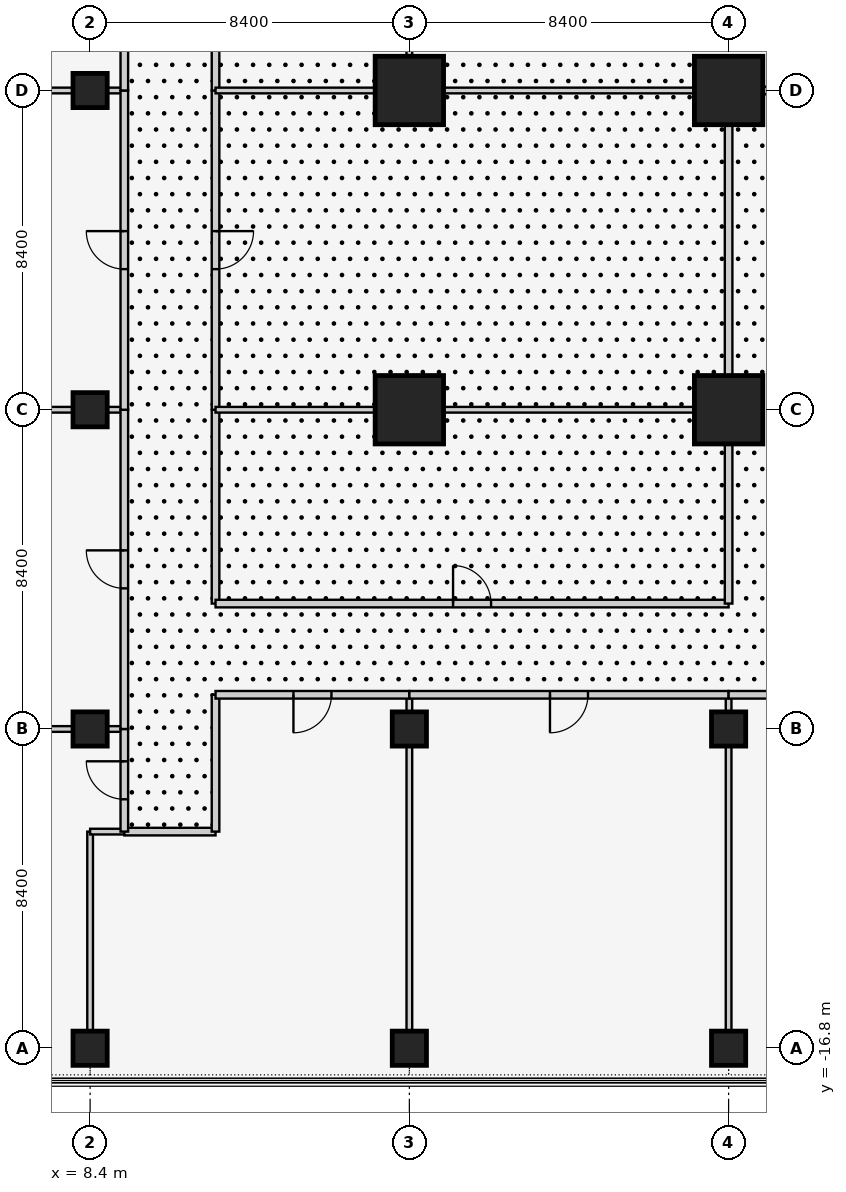
"""IFC4 building model, lengths in metres.
Left out: names, types, materials, properties, quantities, classifications, styles, units other than length and angle.
Written with IfcOpenShell. Run it as: python <this file> out.ifc"""

import sys

from ifc_helpers import new_model, si_unit, direction, frame, frame_2d, origin, origin_2d, place, context, subcontext, project, spatial, rectangle, extrude, element, fill, save


model = new_model("IFC4")
c1 = context("Model", 3, precision=1e-05, world=origin(), true_north=direction((0.0, 1.0)))
c2 = subcontext(c1, "Body", "Model", "MODEL_VIEW")
j1 = project(units=[si_unit("LENGTHUNIT", "METRE"), si_unit("PLANEANGLEUNIT", "RADIAN")], contexts=[c1])
p1 = place(None, origin())
s1 = spatial("IfcSite", under=j1, at=p1, CompositionType="ELEMENT")
p2 = place(p1, origin())
s2 = spatial("IfcBuilding", under=s1, at=p2, CompositionType="ELEMENT")
p3 = place(p2, frame((0.0, 0.0, 6.0)))
s3 = spatial("IfcBuildingStorey", under=s2, at=p3, CompositionType="ELEMENT", Elevation=6.0)
for number, where, z_axis, x_axis in (
    (1, (8.4, -16.8, 0.0), (0.0, 0.0, 1.0), (1.0, 0.0, 0.0)),
    (2, (8.4, -8.4, 0.0), (0.0, 0.0, 1.0), (1.0, 0.0, 0.0)),
    (3, (8.4, 0.0, 0.0), (0.0, 0.0, 1.0), (1.0, 0.0, 0.0)),
    (4, (8.4, 8.4, 0.0), (0.0, 0.0, 1.0), (1.0, 0.0, 0.0)),
    (5, (16.8, -16.8, 0.0), (0.0, 0.0, 1.0), (1.0, 0.0, 0.0)),
    (6, (16.8, -8.4, 0.0), (0.0, 0.0, 1.0), (1.0, 0.0, 0.0)),
):
    element("IfcColumn", number, at=place(p3, frame(where, z_axis=z_axis, x_axis=x_axis)), inside=s3, PredefinedType="COLUMN", context=c2, shape_type="SweptSolid", body=[
        extrude(rectangle(XDim=0.9, YDim=0.9, at=origin_2d()), origin(), (0.0, 0.0, 1.0), 4.5),
    ])
for number, where, z_axis, x_axis in (
    (7, (16.8, 0.0, 0.0), (0.0, 0.0, 1.0), (1.0, 0.0, 0.0)),
    (8, (16.8, 8.4, 0.0), (0.0, 0.0, 1.0), (1.0, 0.0, 0.0)),
):
    element("IfcColumn", number, at=place(p3, frame(where, z_axis=z_axis, x_axis=x_axis)), inside=s3, PredefinedType="COLUMN", context=c2, shape_type="SweptSolid", body=[
        extrude(rectangle(XDim=1.8, YDim=1.8, at=origin_2d()), origin(), (0.0, 0.0, 1.0), 4.5),
    ])
for number, where, z_axis, x_axis in (
    (9, (25.2, -16.8, 0.0), (0.0, 0.0, 1.0), (1.0, 0.0, 0.0)),
    (10, (25.2, -8.4, 0.0), (0.0, 0.0, 1.0), (1.0, 0.0, 0.0)),
):
    element("IfcColumn", number, at=place(p3, frame(where, z_axis=z_axis, x_axis=x_axis)), inside=s3, PredefinedType="COLUMN", context=c2, shape_type="SweptSolid", body=[
        extrude(rectangle(XDim=0.9, YDim=0.9, at=origin_2d()), origin(), (0.0, 0.0, 1.0), 4.5),
    ])
for number, where, z_axis, x_axis in (
    (11, (25.2, 0.0, 0.0), (0.0, 0.0, 1.0), (1.0, 0.0, 0.0)),
    (12, (25.2, 8.4, 0.0), (0.0, 0.0, 1.0), (1.0, 0.0, 0.0)),
):
    element("IfcColumn", number, at=place(p3, frame(where, z_axis=z_axis, x_axis=x_axis)), inside=s3, PredefinedType="COLUMN", context=c2, shape_type="SweptSolid", body=[
        extrude(rectangle(XDim=1.8, YDim=1.8, at=origin_2d()), origin(), (0.0, 0.0, 1.0), 4.5),
    ])
p4 = place(p3, frame((8.4, -16.35, 0.0), z_axis=(0.0, 0.0, 1.0), x_axis=(0.0, 1.0, 0.0)))
e13 = element("IfcWall", 13, at=p4, inside=s3, PredefinedType="PARTITIONING", context=c2, shape_type="SweptSolid", body=[
    extrude(rectangle(XDim=5.25, YDim=0.15, at=frame_2d((2.625, 0.0))), origin(), (0.0, 0.0, 1.0), 3.543),
])
p5 = place(p3, frame((8.4, -11.1, 0.0), z_axis=(0.0, 0.0, 1.0), x_axis=(1.0, 0.0, 0.0)))
e14 = element("IfcWall", 14, at=p5, inside=s3, PredefinedType="PARTITIONING", context=c2, shape_type="SweptSolid", body=[
    extrude(rectangle(XDim=0.9, YDim=0.15, at=frame_2d((0.45, 0.0))), origin(), (0.0, 0.0, 1.0), 4.3),
])
p6 = place(p3, frame((16.8, -8.85, 0.0), z_axis=(0.0, 0.0, 1.0), x_axis=(0.0, -1.0, 0.0)))
e15 = element("IfcWall", 15, at=p6, inside=s3, PredefinedType="PARTITIONING", context=c2, shape_type="SweptSolid", body=[
    extrude(rectangle(XDim=7.5, YDim=0.15, at=frame_2d((3.75, 0.0))), origin(), (0.0, 0.0, 1.0), 3.543),
])
p7 = place(p3, frame((16.8, -7.5, 0.0), z_axis=(0.0, 0.0, 1.0), x_axis=(0.0, -1.0, 0.0)))
e16 = element("IfcWall", 16, at=p7, inside=s3, PredefinedType="PARTITIONING", context=c2, shape_type="SweptSolid", body=[
    extrude(rectangle(XDim=0.45, YDim=0.15, at=frame_2d((0.225, 0.0))), origin(), (0.0, 0.0, 1.0), 3.543),
])
p8 = place(p3, frame((9.3, -11.1, 0.0), z_axis=(0.0, 0.0, 1.0), x_axis=(1.0, 0.0, 0.0)))
e17 = element("IfcWall", 17, at=p8, inside=s3, PredefinedType="PARTITIONING", context=c2, shape_type="SweptSolid", body=[
    extrude(rectangle(XDim=2.4, YDim=0.2, at=frame_2d((1.2, 0.0))), origin(), (0.0, 0.0, 1.0), 4.3),
])
p9 = place(p3, frame((11.7, -11.1, 0.0), z_axis=(0.0, 0.0, 1.0), x_axis=(0.0, 1.0, 0.0)))
e18 = element("IfcWall", 18, at=p9, inside=s3, PredefinedType="PARTITIONING", context=c2, shape_type="SweptSolid", body=[
    extrude(rectangle(XDim=3.6, YDim=0.2, at=frame_2d((1.8, 0.0))), origin(), (0.0, 0.0, 1.0), 4.3),
])
p10 = place(p3, frame((11.7, -7.5, 0.0), z_axis=(0.0, 0.0, 1.0), x_axis=(1.0, 0.0, 0.0)))
e19 = element("IfcWall", 19, at=p10, inside=s3, PredefinedType="PARTITIONING", context=c2, shape_type="SweptSolid", body=[
    extrude(rectangle(XDim=5.1, YDim=0.2, at=frame_2d((2.55, 0.0))), origin(), (0.0, 0.0, 1.0), 4.3),
])
p11 = place(p10, frame((2.05, 0.0, 0.0)))
e20 = element("IfcOpeningElement", 20, at=p11, cuts=e19, PredefinedType="OPENING", context=c2, shape_type="SweptSolid", body=[
    extrude(rectangle(XDim=1.0, YDim=2.1, at=frame_2d((0.5, 1.05))), frame((0.0, 0.11, 0.0), z_axis=(0.0, -1.0, 0.0), x_axis=(1.0, 0.0, 0.0)), (0.0, 0.0, 1.0), 0.22),
])
p12 = place(p3, frame((0.45, -8.4, 0.0), z_axis=(0.0, 0.0, 1.0), x_axis=(1.0, 0.0, 0.0)))
e21 = element("IfcWall", 21, at=p12, inside=s3, PredefinedType="PARTITIONING", context=c2, shape_type="SweptSolid", body=[
    extrude(rectangle(XDim=7.5, YDim=0.15, at=frame_2d((3.75, 0.0))), origin(), (0.0, 0.0, 1.0), 3.543),
])
p13 = place(p3, frame((8.85, -8.4, 0.0), z_axis=(0.0, 0.0, 1.0), x_axis=(1.0, 0.0, 0.0)))
e22 = element("IfcWall", 22, at=p13, inside=s3, PredefinedType="PARTITIONING", context=c2, shape_type="SweptSolid", body=[
    extrude(rectangle(XDim=0.45, YDim=0.15, at=frame_2d((0.225, 0.0))), origin(), (0.0, 0.0, 1.0), 3.543),
])
p14 = place(p3, frame((9.3, -8.4, 0.0), z_axis=(0.0, 0.0, 1.0), x_axis=(0.0, -1.0, 0.0)))
e23 = element("IfcWall", 23, at=p14, inside=s3, PredefinedType="PARTITIONING", context=c2, shape_type="SweptSolid", body=[
    extrude(rectangle(XDim=2.7, YDim=0.2, at=frame_2d((1.35, 0.0))), origin(), (0.0, 0.0, 1.0), 4.3),
])
p15 = place(p14, frame((0.85, 0.0, 0.0)))
e24 = element("IfcOpeningElement", 24, at=p15, cuts=e23, PredefinedType="OPENING", context=c2, shape_type="SweptSolid", body=[
    extrude(rectangle(XDim=1.0, YDim=2.1, at=frame_2d((0.5, 1.05))), frame((0.0, 0.11, 0.0), z_axis=(0.0, -1.0, 0.0), x_axis=(1.0, 0.0, 0.0)), (0.0, 0.0, 1.0), 0.22),
])
p16 = place(p3, frame((25.2, -8.85, 0.0), z_axis=(0.0, 0.0, 1.0), x_axis=(0.0, -1.0, 0.0)))
e25 = element("IfcWall", 25, at=p16, inside=s3, PredefinedType="PARTITIONING", context=c2, shape_type="SweptSolid", body=[
    extrude(rectangle(XDim=7.5, YDim=0.15, at=frame_2d((3.75, 0.0))), origin(), (0.0, 0.0, 1.0), 3.543),
])
p17 = place(p3, frame((25.2, -7.5, 0.0), z_axis=(0.0, 0.0, 1.0), x_axis=(0.0, -1.0, 0.0)))
e26 = element("IfcWall", 26, at=p17, inside=s3, PredefinedType="PARTITIONING", context=c2, shape_type="SweptSolid", body=[
    extrude(rectangle(XDim=0.45, YDim=0.15, at=frame_2d((0.225, 0.0))), origin(), (0.0, 0.0, 1.0), 3.543),
])
p18 = place(p3, frame((16.8, -7.5, 0.0), z_axis=(0.0, 0.0, 1.0), x_axis=(1.0, 0.0, 0.0)))
e27 = element("IfcWall", 27, at=p18, inside=s3, PredefinedType="PARTITIONING", context=c2, shape_type="SweptSolid", body=[
    extrude(rectangle(XDim=8.4, YDim=0.2, at=frame_2d((4.2, 0.0))), origin(), (0.0, 0.0, 1.0), 4.3),
])
p19 = place(p18, frame((3.7, 0.0, 0.0)))
e28 = element("IfcOpeningElement", 28, at=p19, cuts=e27, PredefinedType="OPENING", context=c2, shape_type="SweptSolid", body=[
    extrude(rectangle(XDim=1.0, YDim=2.1, at=frame_2d((0.5, 1.05))), frame((0.0, 0.11, 0.0), z_axis=(0.0, -1.0, 0.0), x_axis=(1.0, 0.0, 0.0)), (0.0, 0.0, 1.0), 0.22),
])
p20 = place(p3, frame((25.2, -7.5, 0.0), z_axis=(0.0, 0.0, 1.0), x_axis=(1.0, 0.0, 0.0)))
e29 = element("IfcWall", 29, at=p20, inside=s3, PredefinedType="PARTITIONING", context=c2, shape_type="SweptSolid", body=[
    extrude(rectangle(XDim=8.4, YDim=0.2, at=frame_2d((4.2, 0.0))), origin(), (0.0, 0.0, 1.0), 4.3),
])
p21 = place(p20, frame((3.7, 0.0, 0.0)))
e30 = element("IfcOpeningElement", 30, at=p21, cuts=e29, PredefinedType="OPENING", context=c2, shape_type="SweptSolid", body=[
    extrude(rectangle(XDim=1.0, YDim=2.1, at=frame_2d((0.5, 1.05))), frame((0.0, 0.11, 0.0), z_axis=(0.0, -1.0, 0.0), x_axis=(1.0, 0.0, 0.0)), (0.0, 0.0, 1.0), 0.22),
])
p22 = place(p3, frame((0.45, 0.0, 0.0), z_axis=(0.0, 0.0, 1.0), x_axis=(1.0, 0.0, 0.0)))
e31 = element("IfcWall", 31, at=p22, inside=s3, PredefinedType="PARTITIONING", context=c2, shape_type="SweptSolid", body=[
    extrude(rectangle(XDim=7.5, YDim=0.15, at=frame_2d((3.75, 0.0))), origin(), (0.0, 0.0, 1.0), 3.543),
])
p23 = place(p3, frame((8.85, 0.0, 0.0), z_axis=(0.0, 0.0, 1.0), x_axis=(1.0, 0.0, 0.0)))
e32 = element("IfcWall", 32, at=p23, inside=s3, PredefinedType="PARTITIONING", context=c2, shape_type="SweptSolid", body=[
    extrude(rectangle(XDim=0.45, YDim=0.15, at=frame_2d((0.225, 0.0))), origin(), (0.0, 0.0, 1.0), 3.543),
])
p24 = place(p3, frame((9.3, 0.0, 0.0), z_axis=(0.0, 0.0, 1.0), x_axis=(0.0, -1.0, 0.0)))
e33 = element("IfcWall", 33, at=p24, inside=s3, PredefinedType="PARTITIONING", context=c2, shape_type="SweptSolid", body=[
    extrude(rectangle(XDim=8.4, YDim=0.2, at=frame_2d((4.2, 0.0))), origin(), (0.0, 0.0, 1.0), 4.3),
])
p25 = place(p24, frame((3.7, 0.0, 0.0)))
e34 = element("IfcOpeningElement", 34, at=p25, cuts=e33, PredefinedType="OPENING", context=c2, shape_type="SweptSolid", body=[
    extrude(rectangle(XDim=1.0, YDim=2.1, at=frame_2d((0.5, 1.05))), frame((0.0, 0.11, 0.0), z_axis=(0.0, -1.0, 0.0), x_axis=(1.0, 0.0, 0.0)), (0.0, 0.0, 1.0), 0.22),
])
p26 = place(p3, frame((0.45, 8.4, 0.0), z_axis=(0.0, 0.0, 1.0), x_axis=(1.0, 0.0, 0.0)))
e35 = element("IfcWall", 35, at=p26, inside=s3, PredefinedType="PARTITIONING", context=c2, shape_type="SweptSolid", body=[
    extrude(rectangle(XDim=7.5, YDim=0.15, at=frame_2d((3.75, 0.0))), origin(), (0.0, 0.0, 1.0), 3.543),
])
p27 = place(p3, frame((8.85, 8.4, 0.0), z_axis=(0.0, 0.0, 1.0), x_axis=(1.0, 0.0, 0.0)))
e36 = element("IfcWall", 36, at=p27, inside=s3, PredefinedType="PARTITIONING", context=c2, shape_type="SweptSolid", body=[
    extrude(rectangle(XDim=0.45, YDim=0.15, at=frame_2d((0.225, 0.0))), origin(), (0.0, 0.0, 1.0), 3.543),
])
p28 = place(p3, frame((9.3, 8.4, 0.0), z_axis=(0.0, 0.0, 1.0), x_axis=(0.0, -1.0, 0.0)))
e37 = element("IfcWall", 37, at=p28, inside=s3, PredefinedType="PARTITIONING", context=c2, shape_type="SweptSolid", body=[
    extrude(rectangle(XDim=8.4, YDim=0.2, at=frame_2d((4.2, 0.0))), origin(), (0.0, 0.0, 1.0), 4.3),
])
p29 = place(p28, frame((3.7, 0.0, 0.0)))
e38 = element("IfcOpeningElement", 38, at=p29, cuts=e37, PredefinedType="OPENING", context=c2, shape_type="SweptSolid", body=[
    extrude(rectangle(XDim=1.0, YDim=2.1, at=frame_2d((0.5, 1.05))), frame((0.0, 0.11, 0.0), z_axis=(0.0, -1.0, 0.0), x_axis=(1.0, 0.0, 0.0)), (0.0, 0.0, 1.0), 0.22),
])
p30 = place(p3, frame((9.3, 15.9, 0.0), z_axis=(0.0, 0.0, 1.0), x_axis=(0.0, -1.0, 0.0)))
e39 = element("IfcWall", 39, at=p30, inside=s3, PredefinedType="PARTITIONING", context=c2, shape_type="SweptSolid", body=[
    extrude(rectangle(XDim=7.5, YDim=0.2, at=frame_2d((3.75, 0.0))), origin(), (0.0, 0.0, 1.0), 4.3),
])
p31 = place(p30, frame((3.25, 0.0, 0.0)))
e40 = element("IfcOpeningElement", 40, at=p31, cuts=e39, PredefinedType="OPENING", context=c2, shape_type="SweptSolid", body=[
    extrude(rectangle(XDim=1.0, YDim=2.1, at=frame_2d((0.5, 1.05))), frame((0.0, 0.11, 0.0), z_axis=(0.0, -1.0, 0.0), x_axis=(1.0, 0.0, 0.0)), (0.0, 0.0, 1.0), 0.22),
])
p32 = place(p3, frame((11.7, 0.0, 0.0), z_axis=(0.0, 0.0, 1.0), x_axis=(0.0, -1.0, 0.0)))
e41 = element("IfcWall", 41, at=p32, inside=s3, PredefinedType="PARTITIONING", context=c2, shape_type="SweptSolid", body=[
    extrude(rectangle(XDim=5.1, YDim=0.2, at=frame_2d((2.55, 0.0))), origin(), (0.0, 0.0, 1.0), 4.3),
])
p33 = place(p3, frame((11.7, -5.1, 0.0), z_axis=(0.0, 0.0, 1.0), x_axis=(1.0, 0.0, 0.0)))
e42 = element("IfcWall", 42, at=p33, inside=s3, PredefinedType="PARTITIONING", context=c2, shape_type="SweptSolid", body=[
    extrude(rectangle(XDim=13.5, YDim=0.2, at=frame_2d((6.75, 0.0))), origin(), (0.0, 0.0, 1.0), 4.3),
])
p34 = place(p33, frame((6.25, 0.0, 0.0)))
e43 = element("IfcOpeningElement", 43, at=p34, cuts=e42, PredefinedType="OPENING", context=c2, shape_type="SweptSolid", body=[
    extrude(rectangle(XDim=1.0, YDim=2.1, at=frame_2d((0.5, 1.05))), frame((0.0, 0.11, 0.0), z_axis=(0.0, -1.0, 0.0), x_axis=(1.0, 0.0, 0.0)), (0.0, 0.0, 1.0), 0.22),
])
p35 = place(p3, frame((25.2, -5.1, 0.0), z_axis=(0.0, 0.0, 1.0), x_axis=(0.0, 1.0, 0.0)))
e44 = element("IfcWall", 44, at=p35, inside=s3, PredefinedType="PARTITIONING", context=c2, shape_type="SweptSolid", body=[
    extrude(rectangle(XDim=4.2, YDim=0.2, at=frame_2d((2.1, 0.0))), origin(), (0.0, 0.0, 1.0), 3.543),
])
p36 = place(p3, frame((11.7, 8.4, 0.0), z_axis=(0.0, 0.0, 1.0), x_axis=(0.0, -1.0, 0.0)))
e45 = element("IfcWall", 45, at=p36, inside=s3, PredefinedType="PARTITIONING", context=c2, shape_type="SweptSolid", body=[
    extrude(rectangle(XDim=8.4, YDim=0.2, at=frame_2d((4.2, 0.0))), origin(), (0.0, 0.0, 1.0), 4.3),
])
p37 = place(p36, frame((3.7, 0.0, 0.0)))
e46 = element("IfcOpeningElement", 46, at=p37, cuts=e45, PredefinedType="OPENING", context=c2, shape_type="SweptSolid", body=[
    extrude(rectangle(XDim=1.0, YDim=2.1, at=frame_2d((0.5, 1.05))), frame((0.0, 0.11, 0.0), z_axis=(0.0, -1.0, 0.0), x_axis=(1.0, 0.0, 0.0)), (0.0, 0.0, 1.0), 0.22),
])
p38 = place(p3, frame((25.2, 0.9, 0.0), z_axis=(0.0, 0.0, 1.0), x_axis=(0.0, 1.0, 0.0)))
e47 = element("IfcWall", 47, at=p38, inside=s3, PredefinedType="PARTITIONING", context=c2, shape_type="SweptSolid", body=[
    extrude(rectangle(XDim=6.6, YDim=0.2, at=frame_2d((3.3, 0.0))), origin(), (0.0, 0.0, 1.0), 3.543),
])
p39 = place(p3, frame((11.7, 16.8, 0.0), z_axis=(0.0, 0.0, 1.0), x_axis=(0.0, -1.0, 0.0)))
e48 = element("IfcWall", 48, at=p39, inside=s3, PredefinedType="PARTITIONING", context=c2, shape_type="SweptSolid", body=[
    extrude(rectangle(XDim=8.4, YDim=0.2, at=frame_2d((4.2, 0.0))), origin(), (0.0, 0.0, 1.0), 4.3),
])
p40 = place(p39, frame((3.7, 0.0, 0.0)))
e49 = element("IfcOpeningElement", 49, at=p40, cuts=e48, PredefinedType="OPENING", context=c2, shape_type="SweptSolid", body=[
    extrude(rectangle(XDim=1.0, YDim=2.1, at=frame_2d((0.5, 1.05))), frame((0.0, 0.11, 0.0), z_axis=(0.0, -1.0, 0.0), x_axis=(1.0, 0.0, 0.0)), (0.0, 0.0, 1.0), 0.22),
])
p41 = place(p3, frame((26.1, 8.4, 0.0), z_axis=(0.0, 0.0, 1.0), x_axis=(1.0, 0.0, 0.0)))
e50 = element("IfcWall", 50, at=p41, inside=s3, PredefinedType="PARTITIONING", context=c2, shape_type="SweptSolid", body=[
    extrude(rectangle(XDim=6.6, YDim=0.2, at=frame_2d((3.3, 0.0))), origin(), (0.0, 0.0, 1.0), 3.543),
])
p42 = place(p41, frame((2.4, 0.0, 0.0)))
e51 = element("IfcOpeningElement", 51, at=p42, cuts=e50, PredefinedType="OPENING", context=c2, shape_type="SweptSolid", body=[
    extrude(rectangle(XDim=1.8, YDim=2.4, at=frame_2d((0.9, 1.2))), frame((0.0, 0.11, 0.0), z_axis=(0.0, -1.0, 0.0), x_axis=(1.0, 0.0, 0.0)), (0.0, 0.0, 1.0), 0.22),
])
p43 = place(p3, frame((11.7, 0.0, 0.0), z_axis=(0.0, 0.0, 1.0), x_axis=(1.0, 0.0, 0.0)))
e52 = element("IfcWall", 52, at=p43, inside=s3, PredefinedType="PARTITIONING", context=c2, shape_type="SweptSolid", body=[
    extrude(rectangle(XDim=4.2, YDim=0.15, at=frame_2d((2.1, 0.0))), origin(), (0.0, 0.0, 1.0), 3.543),
])
p44 = place(p3, frame((17.7, 0.0, 0.0), z_axis=(0.0, 0.0, 1.0), x_axis=(1.0, 0.0, 0.0)))
e53 = element("IfcWall", 53, at=p44, inside=s3, PredefinedType="PARTITIONING", context=c2, shape_type="SweptSolid", body=[
    extrude(rectangle(XDim=6.6, YDim=0.15, at=frame_2d((3.3, 0.0))), origin(), (0.0, 0.0, 1.0), 3.543),
])
p45 = place(p3, frame((11.7, 8.4, 0.0), z_axis=(0.0, 0.0, 1.0), x_axis=(1.0, 0.0, 0.0)))
e54 = element("IfcWall", 54, at=p45, inside=s3, PredefinedType="PARTITIONING", context=c2, shape_type="SweptSolid", body=[
    extrude(rectangle(XDim=4.2, YDim=0.15, at=frame_2d((2.1, 0.0))), origin(), (0.0, 0.0, 1.0), 3.543),
])
p46 = place(p3, frame((17.7, 8.4, 0.0), z_axis=(0.0, 0.0, 1.0), x_axis=(1.0, 0.0, 0.0)))
e55 = element("IfcWall", 55, at=p46, inside=s3, PredefinedType="PARTITIONING", context=c2, shape_type="SweptSolid", body=[
    extrude(rectangle(XDim=6.6, YDim=0.15, at=frame_2d((3.3, 0.0))), origin(), (0.0, 0.0, 1.0), 3.543),
])
p47 = place(p3, frame((16.8, 15.9, 0.0), z_axis=(0.0, 0.0, 1.0), x_axis=(0.0, -1.0, 0.0)))
e56 = element("IfcWall", 56, at=p47, inside=s3, PredefinedType="PARTITIONING", context=c2, shape_type="SweptSolid", body=[
    extrude(rectangle(XDim=6.6, YDim=0.15, at=frame_2d((3.3, 0.0))), origin(), (0.0, 0.0, 1.0), 3.543),
])
p48 = place(p11, frame((1.0, 0.0, 0.0), z_axis=(0.0, 0.0, 1.0), x_axis=(-1.0, 0.0, 0.0)))
e57 = element("IfcDoor", 57, at=p48, inside=s3, OperationType="SINGLE_SWING_RIGHT", PredefinedType="DOOR", context=c2, shape_type="SweptSolid", body=[
    extrude(rectangle(XDim=1.0, YDim=2.1, at=frame_2d((0.5, 1.05))), frame((0.0, 0.025, 0.0), z_axis=(0.0, -1.0, 0.0), x_axis=(1.0, 0.0, 0.0)), (0.0, 0.0, 1.0), 0.05),
])
fill(e20, e57)
p49 = place(p15, frame((1.0, 0.0, 0.0), z_axis=(0.0, 0.0, 1.0), x_axis=(-1.0, 0.0, 0.0)))
e58 = element("IfcDoor", 58, at=p49, inside=s3, OperationType="SINGLE_SWING_RIGHT", PredefinedType="DOOR", context=c2, shape_type="SweptSolid", body=[
    extrude(rectangle(XDim=1.0, YDim=2.1, at=frame_2d((0.5, 1.05))), frame((0.0, 0.025, 0.0), z_axis=(0.0, -1.0, 0.0), x_axis=(1.0, 0.0, 0.0)), (0.0, 0.0, 1.0), 0.05),
])
fill(e24, e58)
p50 = place(p19, frame((1.0, 0.0, 0.0), z_axis=(0.0, 0.0, 1.0), x_axis=(-1.0, 0.0, 0.0)))
e59 = element("IfcDoor", 59, at=p50, inside=s3, OperationType="SINGLE_SWING_RIGHT", PredefinedType="DOOR", context=c2, shape_type="SweptSolid", body=[
    extrude(rectangle(XDim=1.0, YDim=2.1, at=frame_2d((0.5, 1.05))), frame((0.0, 0.025, 0.0), z_axis=(0.0, -1.0, 0.0), x_axis=(1.0, 0.0, 0.0)), (0.0, 0.0, 1.0), 0.05),
])
fill(e28, e59)
p51 = place(p25, frame((1.0, 0.0, 0.0), z_axis=(0.0, 0.0, 1.0), x_axis=(-1.0, 0.0, 0.0)))
e60 = element("IfcDoor", 60, at=p51, inside=s3, OperationType="SINGLE_SWING_RIGHT", PredefinedType="DOOR", context=c2, shape_type="SweptSolid", body=[
    extrude(rectangle(XDim=1.0, YDim=2.1, at=frame_2d((0.5, 1.05))), frame((0.0, 0.025, 0.0), z_axis=(0.0, -1.0, 0.0), x_axis=(1.0, 0.0, 0.0)), (0.0, 0.0, 1.0), 0.05),
])
fill(e34, e60)
p52 = place(p29, frame((1.0, 0.0, 0.0), z_axis=(0.0, 0.0, 1.0), x_axis=(-1.0, 0.0, 0.0)))
e61 = element("IfcDoor", 61, at=p52, inside=s3, OperationType="SINGLE_SWING_RIGHT", PredefinedType="DOOR", context=c2, shape_type="SweptSolid", body=[
    extrude(rectangle(XDim=1.0, YDim=2.1, at=frame_2d((0.5, 1.05))), frame((0.0, 0.025, 0.0), z_axis=(0.0, -1.0, 0.0), x_axis=(1.0, 0.0, 0.0)), (0.0, 0.0, 1.0), 0.05),
])
fill(e38, e61)
p53 = place(p34, origin())
e62 = element("IfcDoor", 62, at=p53, inside=s3, OperationType="SINGLE_SWING_LEFT", PredefinedType="DOOR", context=c2, shape_type="SweptSolid", body=[
    extrude(rectangle(XDim=1.0, YDim=2.1, at=frame_2d((0.5, 1.05))), frame((0.0, 0.025, 0.0), z_axis=(0.0, -1.0, 0.0), x_axis=(1.0, 0.0, 0.0)), (0.0, 0.0, 1.0), 0.05),
])
fill(e43, e62)
p54 = place(p37, origin())
e63 = element("IfcDoor", 63, at=p54, inside=s3, OperationType="SINGLE_SWING_LEFT", PredefinedType="DOOR", context=c2, shape_type="SweptSolid", body=[
    extrude(rectangle(XDim=1.0, YDim=2.1, at=frame_2d((0.5, 1.05))), frame((0.0, 0.025, 0.0), z_axis=(0.0, -1.0, 0.0), x_axis=(1.0, 0.0, 0.0)), (0.0, 0.0, 1.0), 0.05),
])
fill(e46, e63)
save(model, sys.argv[1])
